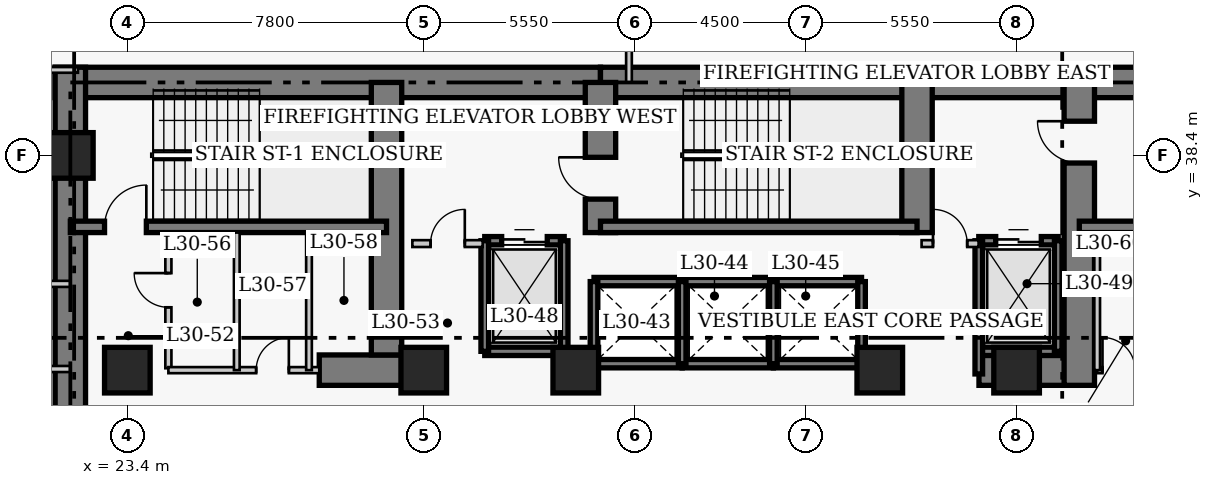
"""IFC4 building model, lengths in metres.
Left out: names, types, materials, properties, quantities, classifications, styles, units other than length and angle.
Written with IfcOpenShell. Run it as: python <this file> out.ifc"""

import sys

from ifc_helpers import new_model, si_unit, direction, frame, frame_2d, origin, origin_2d, place, context, subcontext, project, spatial, rectangle, extrude, element, fill, save


model = new_model("IFC4")
c1 = context("Model", 3, precision=1e-05, world=origin(), true_north=direction((0.0, 1.0)))
c2 = subcontext(c1, "Body", "Model", "MODEL_VIEW")
j1 = project(units=[si_unit("LENGTHUNIT", "METRE"), si_unit("PLANEANGLEUNIT", "RADIAN")], contexts=[c1])
p1 = place(None, origin())
s1 = spatial("IfcSite", under=j1, at=p1, CompositionType="ELEMENT")
p2 = place(p1, origin())
s2 = spatial("IfcBuilding", under=s1, at=p2, CompositionType="ELEMENT")
p3 = place(p2, frame((0.0, 0.0, 122.2)))
s3 = spatial("IfcBuildingStorey", under=s2, at=p3, CompositionType="ELEMENT", Elevation=122.2)
p4 = place(p3, frame((21.5, 40.32, 0.0), z_axis=(0.0, 0.0, 1.0), x_axis=(1.0, 0.0, 0.0)))
e1 = element("IfcWall", 1, at=p4, inside=s3, PredefinedType="SHEAR", context=c2, shape_type="SweptSolid", body=[
    extrude(rectangle(XDim=14.35, YDim=0.8, at=frame_2d((7.175, 0.0))), origin(), (0.0, 0.0, 1.0), 3.8),
])
p5 = place(p3, frame((35.85, 40.32, 0.0), z_axis=(0.0, 0.0, 1.0), x_axis=(1.0, 0.0, 0.0)))
e2 = element("IfcWall", 2, at=p5, inside=s3, PredefinedType="SHEAR", context=c2, shape_type="SweptSolid", body=[
    extrude(rectangle(XDim=12.6, YDim=0.8, at=frame_2d((6.3, 0.0))), origin(), (0.0, 0.0, 1.0), 3.8),
])
p6 = place(p3, frame((48.45, 40.32, 0.0), z_axis=(0.0, 0.0, 1.0), x_axis=(1.0, 0.0, 0.0)))
e3 = element("IfcWall", 3, at=p6, inside=s3, PredefinedType="SHEAR", context=c2, shape_type="SweptSolid", body=[
    extrude(rectangle(XDim=8.87, YDim=0.8, at=frame_2d((4.435, 0.0))), origin(), (0.0, 0.0, 1.0), 3.8),
])
p7 = place(p3, frame((21.9, 27.05, 0.0), z_axis=(0.0, 0.0, 1.0), x_axis=(0.0, 1.0, 0.0)))
e4 = element("IfcWall", 4, at=p7, inside=s3, PredefinedType="SHEAR", context=c2, shape_type="SweptSolid", body=[
    extrude(rectangle(XDim=13.67, YDim=0.8, at=frame_2d((6.835, 0.0))), origin(), (0.0, 0.0, 1.0), 3.8),
])
p8 = place(p3, frame((28.45, 32.75, 0.0), z_axis=(0.0, 0.0, 1.0), x_axis=(1.0, 0.0, 0.0)))
e5 = element("IfcWall", 5, at=p8, inside=s3, PredefinedType="SHEAR", context=c2, shape_type="SweptSolid", body=[
    extrude(rectangle(XDim=2.4, YDim=0.8, at=frame_2d((1.2, 0.0))), origin(), (0.0, 0.0, 1.0), 3.8),
])
p9 = place(p3, frame((45.81, 32.75, 0.0), z_axis=(0.0, 0.0, 1.0), x_axis=(1.0, 0.0, 0.0)))
e6 = element("IfcWall", 6, at=p9, inside=s3, PredefinedType="SHEAR", context=c2, shape_type="SweptSolid", body=[
    extrude(rectangle(XDim=2.64, YDim=0.8, at=frame_2d((1.32, 0.0))), origin(), (0.0, 0.0, 1.0), 3.8),
])
p10 = place(p3, frame((30.22, 33.15, 0.0), z_axis=(0.0, 0.0, 1.0), x_axis=(0.0, 1.0, 0.0)))
e7 = element("IfcWall", 7, at=p10, inside=s3, PredefinedType="SHEAR", context=c2, shape_type="SweptSolid", body=[
    extrude(rectangle(XDim=7.17, YDim=0.8, at=frame_2d((3.585, 0.0))), origin(), (0.0, 0.0, 1.0), 3.8),
])
p11 = place(p3, frame((35.85, 36.37, 0.0), z_axis=(0.0, 0.0, 1.0), x_axis=(0.0, 1.0, 0.0)))
e8 = element("IfcWall", 8, at=p11, inside=s3, PredefinedType="SHEAR", context=c2, shape_type="SweptSolid", body=[
    extrude(rectangle(XDim=3.95, YDim=0.8, at=frame_2d((1.975, 0.0))), origin(), (0.0, 0.0, 1.0), 3.8),
])
p12 = place(p11, frame((0.88, 0.0, 0.0)))
e9 = element("IfcOpeningElement", 9, at=p12, cuts=e8, PredefinedType="OPENING", context=c2, shape_type="SweptSolid", body=[
    extrude(rectangle(XDim=1.1, YDim=2.15, at=frame_2d((0.55, 1.075))), frame((0.0, 0.41, 0.0), z_axis=(0.0, -1.0, 0.0), x_axis=(1.0, 0.0, 0.0)), (0.0, 0.0, 1.0), 0.82),
])
p13 = place(p3, frame((44.18, 36.37, 0.0), z_axis=(0.0, 0.0, 1.0), x_axis=(0.0, 1.0, 0.0)))
e10 = element("IfcWall", 10, at=p13, inside=s3, PredefinedType="SHEAR", context=c2, shape_type="SweptSolid", body=[
    extrude(rectangle(XDim=3.95, YDim=0.8, at=frame_2d((1.975, 0.0))), origin(), (0.0, 0.0, 1.0), 3.8),
])
p14 = place(p3, frame((48.45, 32.35, 0.0), z_axis=(0.0, 0.0, 1.0), x_axis=(0.0, 1.0, 0.0)))
e11 = element("IfcWall", 11, at=p14, inside=s3, PredefinedType="SHEAR", context=c2, shape_type="SweptSolid", body=[
    extrude(rectangle(XDim=7.97, YDim=0.8, at=frame_2d((3.985, 0.0))), origin(), (0.0, 0.0, 1.0), 3.8),
])
p15 = place(p14, frame((5.85, 0.0, 0.0)))
e12 = element("IfcOpeningElement", 12, at=p15, cuts=e11, PredefinedType="OPENING", context=c2, shape_type="SweptSolid", body=[
    extrude(rectangle(XDim=1.1, YDim=2.15, at=frame_2d((0.55, 1.075))), frame((0.0, 0.41, 0.0), z_axis=(0.0, -1.0, 0.0), x_axis=(1.0, 0.0, 0.0)), (0.0, 0.0, 1.0), 0.82),
])
p16 = place(p3, frame((21.9, 36.52, 0.0), z_axis=(0.0, 0.0, 1.0), x_axis=(1.0, 0.0, 0.0)))
e13 = element("IfcWall", 13, at=p16, inside=s3, PredefinedType="SHEAR", context=c2, shape_type="SweptSolid", body=[
    extrude(rectangle(XDim=8.32, YDim=0.3, at=frame_2d((4.16, 0.0))), origin(), (0.0, 0.0, 1.0), 3.8),
])
p17 = place(p16, frame((0.9, 0.0, 0.0)))
e14 = element("IfcOpeningElement", 14, at=p17, cuts=e13, PredefinedType="OPENING", context=c2, shape_type="SweptSolid", body=[
    extrude(rectangle(XDim=1.1, YDim=2.15, at=frame_2d((0.55, 1.075))), frame((0.0, 0.16, 0.0), z_axis=(0.0, -1.0, 0.0), x_axis=(1.0, 0.0, 0.0)), (0.0, 0.0, 1.0), 0.32),
])
p18 = place(p3, frame((35.85, 36.52, 0.0), z_axis=(0.0, 0.0, 1.0), x_axis=(1.0, 0.0, 0.0)))
e15 = element("IfcWall", 15, at=p18, inside=s3, PredefinedType="SHEAR", context=c2, shape_type="SweptSolid", body=[
    extrude(rectangle(XDim=8.33, YDim=0.3, at=frame_2d((4.165, 0.0))), origin(), (0.0, 0.0, 1.0), 3.8),
])
p19 = place(p3, frame((48.45, 36.52, 0.0), z_axis=(0.0, 0.0, 1.0), x_axis=(1.0, 0.0, 0.0)))
e16 = element("IfcWall", 16, at=p19, inside=s3, PredefinedType="SHEAR", context=c2, shape_type="SweptSolid", body=[
    extrude(rectangle(XDim=8.47, YDim=0.3, at=frame_2d((4.235, 0.0))), origin(), (0.0, 0.0, 1.0), 3.8),
])
for number, where, z_axis, x_axis in (
    (17, (21.9, 38.4, 0.0), (0.0, 0.0, 1.0), (1.0, 0.0, 0.0)),
    (18, (23.4, 32.75, 0.0), (0.0, 0.0, 1.0), (1.0, 0.0, 0.0)),
    (19, (31.2, 32.75, 0.0), (0.0, 0.0, 1.0), (1.0, 0.0, 0.0)),
    (20, (35.2, 32.75, 0.0), (0.0, 0.0, 1.0), (1.0, 0.0, 0.0)),
    (21, (43.2, 32.75, 0.0), (0.0, 0.0, 1.0), (1.0, 0.0, 0.0)),
    (22, (46.8, 32.75, 0.0), (0.0, 0.0, 1.0), (1.0, 0.0, 0.0)),
):
    element("IfcColumn", number, at=place(p3, frame(where, z_axis=z_axis, x_axis=x_axis)), inside=s3, PredefinedType="COLUMN", context=c2, shape_type="SweptSolid", body=[
        extrude(rectangle(XDim=1.2, YDim=1.2, at=origin_2d()), origin(), (0.0, 0.0, 1.0), 3.8),
    ])
for number, where, z_axis, x_axis in (
    (23, (35.68, 35.08, 0.0), (0.0, 0.0, 1.0), (1.0, 0.0, 0.0)),
    (24, (35.68, 32.92, 0.0), (0.0, 0.0, 1.0), (1.0, 0.0, 0.0)),
):
    element("IfcWall", number, at=place(p3, frame(where, z_axis=z_axis, x_axis=x_axis)), inside=s3, PredefinedType="SHEAR", context=c2, shape_type="SweptSolid", body=[
        extrude(rectangle(XDim=2.32, YDim=0.22, at=frame_2d((1.16, 0.0))), origin(), (0.0, 0.0, 1.0), 3.8),
    ])
p20 = place(p3, frame((35.68, 32.92, 0.0), z_axis=(0.0, 0.0, 1.0), x_axis=(0.0, 1.0, 0.0)))
e25 = element("IfcWall", 25, at=p20, inside=s3, PredefinedType="SHEAR", context=c2, shape_type="SweptSolid", body=[
    extrude(rectangle(XDim=2.16, YDim=0.2, at=frame_2d((1.08, 0.0))), origin(), (0.0, 0.0, 1.0), 3.8),
])
for number, where, z_axis, x_axis in (
    (26, (38.0, 35.08, 0.0), (0.0, 0.0, 1.0), (1.0, 0.0, 0.0)),
    (27, (38.0, 32.92, 0.0), (0.0, 0.0, 1.0), (1.0, 0.0, 0.0)),
):
    element("IfcWall", number, at=place(p3, frame(where, z_axis=z_axis, x_axis=x_axis)), inside=s3, PredefinedType="SHEAR", context=c2, shape_type="SweptSolid", body=[
        extrude(rectangle(XDim=2.4, YDim=0.22, at=frame_2d((1.2, 0.0))), origin(), (0.0, 0.0, 1.0), 3.8),
    ])
p21 = place(p3, frame((38.0, 32.92, 0.0), z_axis=(0.0, 0.0, 1.0), x_axis=(0.0, 1.0, 0.0)))
e28 = element("IfcWall", 28, at=p21, inside=s3, PredefinedType="SHEAR", context=c2, shape_type="SweptSolid", body=[
    extrude(rectangle(XDim=2.16, YDim=0.2, at=frame_2d((1.08, 0.0))), origin(), (0.0, 0.0, 1.0), 3.8),
])
for number, where, z_axis, x_axis in (
    (29, (40.4, 35.08, 0.0), (0.0, 0.0, 1.0), (1.0, 0.0, 0.0)),
    (30, (40.4, 32.92, 0.0), (0.0, 0.0, 1.0), (1.0, 0.0, 0.0)),
):
    element("IfcWall", number, at=place(p3, frame(where, z_axis=z_axis, x_axis=x_axis)), inside=s3, PredefinedType="SHEAR", context=c2, shape_type="SweptSolid", body=[
        extrude(rectangle(XDim=2.32, YDim=0.22, at=frame_2d((1.16, 0.0))), origin(), (0.0, 0.0, 1.0), 3.8),
    ])
for number, where, z_axis, x_axis in (
    (31, (40.4, 32.92, 0.0), (0.0, 0.0, 1.0), (0.0, 1.0, 0.0)),
    (32, (42.72, 32.92, 0.0), (0.0, 0.0, 1.0), (0.0, 1.0, 0.0)),
):
    element("IfcWall", number, at=place(p3, frame(where, z_axis=z_axis, x_axis=x_axis)), inside=s3, PredefinedType="SHEAR", context=c2, shape_type="SweptSolid", body=[
        extrude(rectangle(XDim=2.16, YDim=0.2, at=frame_2d((1.08, 0.0))), origin(), (0.0, 0.0, 1.0), 3.8),
    ])
p22 = place(p3, frame((32.805, 36.155, 0.0), z_axis=(0.0, 0.0, 1.0), x_axis=(1.0, 0.0, 0.0)))
e33 = element("IfcWall", 33, at=p22, inside=s3, PredefinedType="SHEAR", context=c2, shape_type="SweptSolid", body=[
    extrude(rectangle(XDim=2.09, YDim=0.22, at=frame_2d((1.045, 0.0))), origin(), (0.0, 0.0, 1.0), 3.8),
])
p23 = place(p22, frame((0.445, 0.0, 0.0)))
e34 = element("IfcOpeningElement", 34, at=p23, cuts=e33, PredefinedType="OPENING", context=c2, shape_type="SweptSolid", body=[
    extrude(rectangle(XDim=1.2, YDim=2.15, at=frame_2d((0.6, 1.075))), frame((0.0, 0.12, 0.0), z_axis=(0.0, -1.0, 0.0), x_axis=(1.0, 0.0, 0.0)), (0.0, 0.0, 1.0), 0.24),
])
p24 = place(p3, frame((32.805, 33.245, 0.0), z_axis=(0.0, 0.0, 1.0), x_axis=(1.0, 0.0, 0.0)))
e35 = element("IfcWall", 35, at=p24, inside=s3, PredefinedType="SHEAR", context=c2, shape_type="SweptSolid", body=[
    extrude(rectangle(XDim=2.09, YDim=0.22, at=frame_2d((1.045, 0.0))), origin(), (0.0, 0.0, 1.0), 3.8),
])
for number, where, z_axis, x_axis in (
    (36, (32.805, 33.245, 0.0), (0.0, 0.0, 1.0), (0.0, 1.0, 0.0)),
    (37, (34.895, 33.245, 0.0), (0.0, 0.0, 1.0), (0.0, 1.0, 0.0)),
):
    element("IfcWall", number, at=place(p3, frame(where, z_axis=z_axis, x_axis=x_axis)), inside=s3, PredefinedType="SHEAR", context=c2, shape_type="SweptSolid", body=[
        extrude(rectangle(XDim=2.91, YDim=0.2, at=frame_2d((1.455, 0.0))), origin(), (0.0, 0.0, 1.0), 3.8),
    ])
p25 = place(p3, frame((45.805, 36.155, 0.0), z_axis=(0.0, 0.0, 1.0), x_axis=(1.0, 0.0, 0.0)))
e38 = element("IfcWall", 38, at=p25, inside=s3, PredefinedType="SHEAR", context=c2, shape_type="SweptSolid", body=[
    extrude(rectangle(XDim=2.09, YDim=0.22, at=frame_2d((1.045, 0.0))), origin(), (0.0, 0.0, 1.0), 3.8),
])
p26 = place(p25, frame((0.445, 0.0, 0.0)))
e39 = element("IfcOpeningElement", 39, at=p26, cuts=e38, PredefinedType="OPENING", context=c2, shape_type="SweptSolid", body=[
    extrude(rectangle(XDim=1.2, YDim=2.15, at=frame_2d((0.6, 1.075))), frame((0.0, 0.12, 0.0), z_axis=(0.0, -1.0, 0.0), x_axis=(1.0, 0.0, 0.0)), (0.0, 0.0, 1.0), 0.24),
])
p27 = place(p3, frame((45.805, 33.245, 0.0), z_axis=(0.0, 0.0, 1.0), x_axis=(1.0, 0.0, 0.0)))
e40 = element("IfcWall", 40, at=p27, inside=s3, PredefinedType="SHEAR", context=c2, shape_type="SweptSolid", body=[
    extrude(rectangle(XDim=2.09, YDim=0.22, at=frame_2d((1.045, 0.0))), origin(), (0.0, 0.0, 1.0), 3.8),
])
p28 = place(p3, frame((45.805, 32.65, 0.0), z_axis=(0.0, 0.0, 1.0), x_axis=(0.0, 1.0, 0.0)))
e41 = element("IfcWall", 41, at=p28, inside=s3, PredefinedType="SHEAR", context=c2, shape_type="SweptSolid", body=[
    extrude(rectangle(XDim=3.505, YDim=0.2, at=frame_2d((1.752, 0.0))), origin(), (0.0, 0.0, 1.0), 3.8),
])
p29 = place(p3, frame((47.895, 33.245, 0.0), z_axis=(0.0, 0.0, 1.0), x_axis=(0.0, 1.0, 0.0)))
e42 = element("IfcWall", 42, at=p29, inside=s3, PredefinedType="SHEAR", context=c2, shape_type="SweptSolid", body=[
    extrude(rectangle(XDim=2.91, YDim=0.2, at=frame_2d((1.455, 0.0))), origin(), (0.0, 0.0, 1.0), 3.8),
])
p30 = place(p3, frame((30.9, 36.08, 0.0), z_axis=(0.0, 0.0, 1.0), x_axis=(1.0, 0.0, 0.0)))
e43 = element("IfcWall", 43, at=p30, inside=s3, PredefinedType="PARTITIONING", context=c2, shape_type="SweptSolid", body=[
    extrude(rectangle(XDim=1.85, YDim=0.18, at=frame_2d((0.925, 0.0))), origin(), (0.0, 0.0, 1.0), 3.54),
])
p31 = place(p30, frame((0.48, 0.0, 0.0)))
e44 = element("IfcOpeningElement", 44, at=p31, cuts=e43, PredefinedType="OPENING", context=c2, shape_type="SweptSolid", body=[
    extrude(rectangle(XDim=0.9, YDim=2.15, at=frame_2d((0.45, 1.075))), frame((0.0, 0.1, 0.0), z_axis=(0.0, -1.0, 0.0), x_axis=(1.0, 0.0, 0.0)), (0.0, 0.0, 1.0), 0.2),
])
p32 = place(p3, frame((44.3, 36.08, 0.0), z_axis=(0.0, 0.0, 1.0), x_axis=(1.0, 0.0, 0.0)))
e45 = element("IfcWall", 45, at=p32, inside=s3, PredefinedType="PARTITIONING", context=c2, shape_type="SweptSolid", body=[
    extrude(rectangle(XDim=1.5, YDim=0.18, at=frame_2d((0.75, 0.0))), origin(), (0.0, 0.0, 1.0), 3.54),
])
p33 = place(p32, frame((0.3, 0.0, 0.0)))
e46 = element("IfcOpeningElement", 46, at=p33, cuts=e45, PredefinedType="OPENING", context=c2, shape_type="SweptSolid", body=[
    extrude(rectangle(XDim=0.9, YDim=2.15, at=frame_2d((0.45, 1.075))), frame((0.0, 0.1, 0.0), z_axis=(0.0, -1.0, 0.0), x_axis=(1.0, 0.0, 0.0)), (0.0, 0.0, 1.0), 0.2),
])
p34 = place(p3, frame((24.48, 32.8, 0.0), z_axis=(0.0, 0.0, 1.0), x_axis=(0.0, 1.0, 0.0)))
e47 = element("IfcWall", 47, at=p34, inside=s3, PredefinedType="PARTITIONING", context=c2, shape_type="SweptSolid", body=[
    extrude(rectangle(XDim=3.57, YDim=0.16, at=frame_2d((1.785, 0.0))), origin(), (0.0, 0.0, 1.0), 3.54),
])
p35 = place(p34, frame((1.604, 0.0, 0.0)))
e48 = element("IfcOpeningElement", 48, at=p35, cuts=e47, PredefinedType="OPENING", context=c2, shape_type="SweptSolid", body=[
    extrude(rectangle(XDim=0.9, YDim=2.1, at=frame_2d((0.45, 1.05))), frame((0.0, 0.09, 0.0), z_axis=(0.0, -1.0, 0.0), x_axis=(1.0, 0.0, 0.0)), (0.0, 0.0, 1.0), 0.18),
])
p36 = place(p3, frame((24.48, 32.75, 0.0), z_axis=(0.0, 0.0, 1.0), x_axis=(1.0, 0.0, 0.0)))
e49 = element("IfcWall", 49, at=p36, inside=s3, PredefinedType="PARTITIONING", context=c2, shape_type="SweptSolid", body=[
    extrude(rectangle(XDim=3.97, YDim=0.16, at=frame_2d((1.985, 0.0))), origin(), (0.0, 0.0, 1.0), 3.54),
])
p37 = place(p36, frame((2.31, 0.0, 0.0)))
e50 = element("IfcOpeningElement", 50, at=p37, cuts=e49, PredefinedType="OPENING", context=c2, shape_type="SweptSolid", body=[
    extrude(rectangle(XDim=0.86, YDim=2.05, at=frame_2d((0.43, 1.025))), frame((0.0, 0.09, 0.0), z_axis=(0.0, -1.0, 0.0), x_axis=(1.0, 0.0, 0.0)), (0.0, 0.0, 1.0), 0.18),
])
p38 = place(p3, frame((48.92, 32.75, 0.0), z_axis=(0.0, 0.0, 1.0), x_axis=(1.0, 0.0, 0.0)))
e51 = element("IfcWall", 51, at=p38, inside=s3, PredefinedType="PARTITIONING", context=c2, shape_type="SweptSolid", body=[
    extrude(rectangle(XDim=2.2, YDim=0.16, at=frame_2d((1.1, 0.0))), origin(), (0.0, 0.0, 1.0), 3.54),
])
p39 = place(p38, frame((0.14, 0.0, 0.0)))
e52 = element("IfcOpeningElement", 52, at=p39, cuts=e51, PredefinedType="OPENING", context=c2, shape_type="SweptSolid", body=[
    extrude(rectangle(XDim=0.86, YDim=2.05, at=frame_2d((0.43, 1.025))), frame((0.0, 0.09, 0.0), z_axis=(0.0, -1.0, 0.0), x_axis=(1.0, 0.0, 0.0)), (0.0, 0.0, 1.0), 0.18),
])
p40 = place(p38, frame((1.2, 0.0, 0.0)))
e53 = element("IfcOpeningElement", 53, at=p40, cuts=e51, PredefinedType="OPENING", context=c2, shape_type="SweptSolid", body=[
    extrude(rectangle(XDim=0.86, YDim=2.05, at=frame_2d((0.43, 1.025))), frame((0.0, 0.09, 0.0), z_axis=(0.0, -1.0, 0.0), x_axis=(1.0, 0.0, 0.0)), (0.0, 0.0, 1.0), 0.18),
])
for number, where, z_axis, x_axis in (
    (54, (48.92, 32.75, 0.0), (0.0, 0.0, 1.0), (0.0, 1.0, 0.0)),
    (55, (26.28, 32.75, 0.0), (0.0, 0.0, 1.0), (0.0, 1.0, 0.0)),
    (56, (28.18, 32.75, 0.0), (0.0, 0.0, 1.0), (0.0, 1.0, 0.0)),
):
    element("IfcWall", number, at=place(p3, frame(where, z_axis=z_axis, x_axis=x_axis)), inside=s3, PredefinedType="PARTITIONING", context=c2, shape_type="SweptSolid", body=[
        extrude(rectangle(XDim=3.62, YDim=0.15, at=frame_2d((1.81, 0.0))), origin(), (0.0, 0.0, 1.0), 3.54),
    ])
for number, where, z_axis, x_axis in (
    (57, (20.46, 35.02, 0.0), (0.0, 0.0, 1.0), (1.0, 0.0, 0.0)),
    (58, (20.46, 32.78, 0.0), (0.0, 0.0, 1.0), (1.0, 0.0, 0.0)),
):
    element("IfcWall", number, at=place(p3, frame(where, z_axis=z_axis, x_axis=x_axis)), inside=s3, PredefinedType="PARTITIONING", context=c2, shape_type="SweptSolid", body=[
        extrude(rectangle(XDim=1.44, YDim=0.16, at=frame_2d((0.72, 0.0))), origin(), (0.0, 0.0, 1.0), 3.54),
    ])
p41 = place(p3, frame((18.24, 40.65, 0.0), z_axis=(0.0, 0.0, 1.0), x_axis=(1.0, 0.0, 0.0)))
e59 = element("IfcWall", 59, at=p41, inside=s3, PredefinedType="PARTITIONING", context=c2, shape_type="SweptSolid", body=[
    extrude(rectangle(XDim=3.86, YDim=0.15, at=frame_2d((1.93, 0.0))), origin(), (0.0, 0.0, 1.0), 3.54),
])
p42 = place(p41, frame((0.55, 0.0, 0.0)))
e60 = element("IfcOpeningElement", 60, at=p42, cuts=e59, PredefinedType="OPENING", context=c2, shape_type="SweptSolid", body=[
    extrude(rectangle(XDim=1.0, YDim=2.15, at=frame_2d((0.5, 1.075))), frame((0.0, 0.085, 0.0), z_axis=(0.0, -1.0, 0.0), x_axis=(1.0, 0.0, 0.0)), (0.0, 0.0, 1.0), 0.17),
])
p43 = place(p3, frame((36.6, 40.32, 0.0), z_axis=(0.0, 0.0, 1.0), x_axis=(0.0, 1.0, 0.0)))
e61 = element("IfcWall", 61, at=p43, inside=s3, PredefinedType="PARTITIONING", context=c2, shape_type="SweptSolid", body=[
    extrude(rectangle(XDim=3.445, YDim=0.15, at=frame_2d((1.723, 0.0))), origin(), (0.0, 0.0, 1.0), 3.54),
])
p44 = place(p23, origin())
e62 = element("IfcDoor", 62, at=p44, inside=s3, OperationType="DOUBLE_DOOR_SLIDING", PredefinedType="DOOR", context=c2, shape_type="SweptSolid", body=[
    extrude(rectangle(XDim=1.2, YDim=2.15, at=frame_2d((0.6, 1.075))), frame((0.0, 0.025, 0.0), z_axis=(0.0, -1.0, 0.0), x_axis=(1.0, 0.0, 0.0)), (0.0, 0.0, 1.0), 0.05),
])
fill(e34, e62)
p45 = place(p26, origin())
e63 = element("IfcDoor", 63, at=p45, inside=s3, OperationType="DOUBLE_DOOR_SLIDING", PredefinedType="DOOR", context=c2, shape_type="SweptSolid", body=[
    extrude(rectangle(XDim=1.2, YDim=2.15, at=frame_2d((0.6, 1.075))), frame((0.0, 0.025, 0.0), z_axis=(0.0, -1.0, 0.0), x_axis=(1.0, 0.0, 0.0)), (0.0, 0.0, 1.0), 0.05),
])
fill(e39, e63)
p46 = place(p31, origin())
e64 = element("IfcDoor", 64, at=p46, inside=s3, OperationType="SINGLE_SWING_RIGHT", PredefinedType="DOOR", context=c2, shape_type="SweptSolid", body=[
    extrude(rectangle(XDim=0.9, YDim=2.15, at=frame_2d((0.45, 1.075))), frame((0.0, 0.025, 0.0), z_axis=(0.0, -1.0, 0.0), x_axis=(1.0, 0.0, 0.0)), (0.0, 0.0, 1.0), 0.05),
])
fill(e44, e64)
p47 = place(p33, origin())
e65 = element("IfcDoor", 65, at=p47, inside=s3, OperationType="SINGLE_SWING_LEFT", PredefinedType="DOOR", context=c2, shape_type="SweptSolid", body=[
    extrude(rectangle(XDim=0.9, YDim=2.15, at=frame_2d((0.45, 1.075))), frame((0.0, 0.025, 0.0), z_axis=(0.0, -1.0, 0.0), x_axis=(1.0, 0.0, 0.0)), (0.0, 0.0, 1.0), 0.05),
])
fill(e46, e65)
p48 = place(p35, origin())
e66 = element("IfcDoor", 66, at=p48, inside=s3, OperationType="SINGLE_SWING_RIGHT", PredefinedType="DOOR", context=c2, shape_type="SweptSolid", body=[
    extrude(rectangle(XDim=0.9, YDim=2.1, at=frame_2d((0.45, 1.05))), frame((0.0, 0.025, 0.0), z_axis=(0.0, -1.0, 0.0), x_axis=(1.0, 0.0, 0.0)), (0.0, 0.0, 1.0), 0.05),
])
fill(e48, e66)
p49 = place(p37, origin())
e67 = element("IfcDoor", 67, at=p49, inside=s3, OperationType="SINGLE_SWING_RIGHT", PredefinedType="DOOR", context=c2, shape_type="SweptSolid", body=[
    extrude(rectangle(XDim=0.86, YDim=2.05, at=frame_2d((0.43, 1.025))), frame((0.0, 0.025, 0.0), z_axis=(0.0, -1.0, 0.0), x_axis=(1.0, 0.0, 0.0)), (0.0, 0.0, 1.0), 0.05),
])
fill(e50, e67)
p50 = place(p39, origin())
e68 = element("IfcDoor", 68, at=p50, inside=s3, OperationType="SINGLE_SWING_LEFT", PredefinedType="DOOR", context=c2, shape_type="SweptSolid", body=[
    extrude(rectangle(XDim=0.86, YDim=2.05, at=frame_2d((0.43, 1.025))), frame((0.0, 0.025, 0.0), z_axis=(0.0, -1.0, 0.0), x_axis=(1.0, 0.0, 0.0)), (0.0, 0.0, 1.0), 0.05),
])
fill(e52, e68)
p51 = place(p17, origin())
e69 = element("IfcDoor", 69, at=p51, inside=s3, OperationType="SINGLE_SWING_RIGHT", PredefinedType="DOOR", context=c2, shape_type="SweptSolid", body=[
    extrude(rectangle(XDim=1.1, YDim=2.15, at=frame_2d((0.55, 1.075))), frame((0.0, 0.025, 0.0), z_axis=(0.0, -1.0, 0.0), x_axis=(1.0, 0.0, 0.0)), (0.0, 0.0, 1.0), 0.05),
])
fill(e14, e69)
p52 = place(p12, origin())
e70 = element("IfcDoor", 70, at=p52, inside=s3, OperationType="SINGLE_SWING_RIGHT", PredefinedType="DOOR", context=c2, shape_type="SweptSolid", body=[
    extrude(rectangle(XDim=1.1, YDim=2.15, at=frame_2d((0.55, 1.075))), frame((0.0, 0.025, 0.0), z_axis=(0.0, -1.0, 0.0), x_axis=(1.0, 0.0, 0.0)), (0.0, 0.0, 1.0), 0.05),
])
fill(e9, e70)
p53 = place(p15, origin())
e71 = element("IfcDoor", 71, at=p53, inside=s3, OperationType="SINGLE_SWING_RIGHT", PredefinedType="DOOR", context=c2, shape_type="SweptSolid", body=[
    extrude(rectangle(XDim=1.1, YDim=2.15, at=frame_2d((0.55, 1.075))), frame((0.0, 0.025, 0.0), z_axis=(0.0, -1.0, 0.0), x_axis=(1.0, 0.0, 0.0)), (0.0, 0.0, 1.0), 0.05),
])
fill(e12, e71)
save(model, sys.argv[1])
